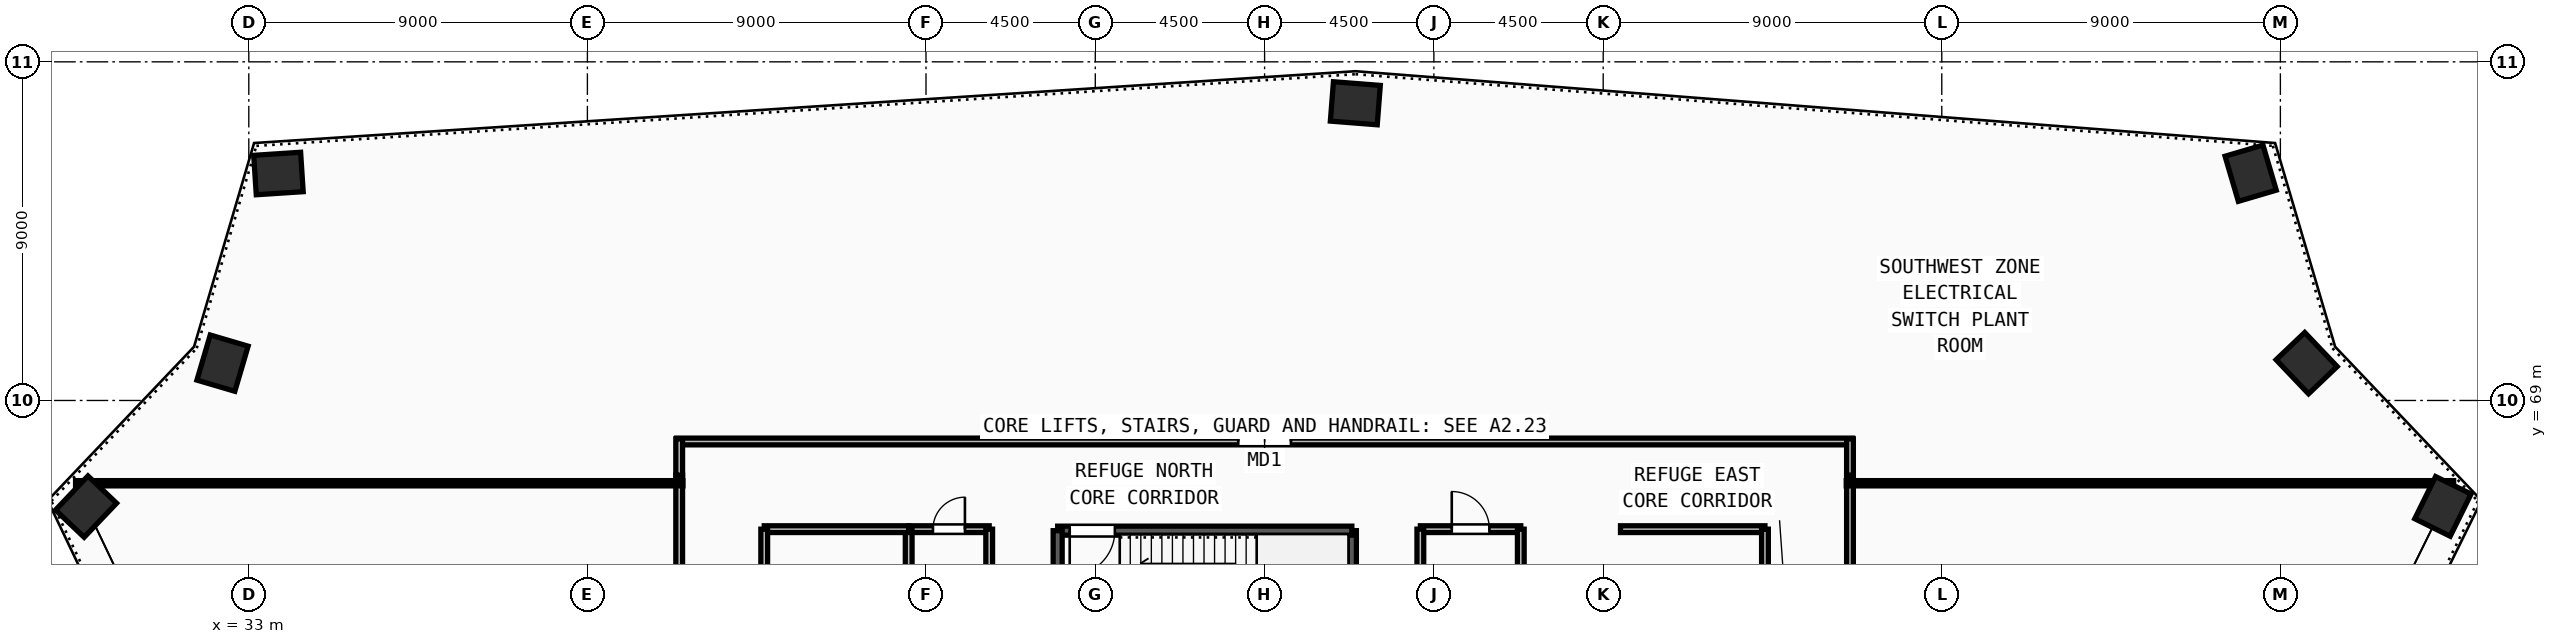
"""IFC4 building model, lengths in metres.
Left out: names, types, materials, properties, quantities, classifications, styles, units other than length and angle.
Written with IfcOpenShell. Run it as: python <this file> out.ifc"""

import sys

from ifc_helpers import new_model, si_unit, direction, frame, frame_2d, origin, origin_2d, place, context, subcontext, project, spatial, rectangle, extrude, source, transform, mapped, element, fill, save


model = new_model("IFC4")
c1 = context("Model", 3, precision=1e-05, world=origin(), true_north=direction((0.0, 1.0)))
c2 = subcontext(c1, "Body", "Model", "MODEL_VIEW")
j1 = project(units=[si_unit("LENGTHUNIT", "METRE"), si_unit("PLANEANGLEUNIT", "RADIAN")], contexts=[c1])
p1 = place(None, origin())
s1 = spatial("IfcSite", under=j1, at=p1, CompositionType="ELEMENT")
p2 = place(p1, origin())
s2 = spatial("IfcBuilding", under=s1, at=p2, CompositionType="ELEMENT")
p3 = place(p2, frame((0.0, 0.0, 277.5)))
s3 = spatial("IfcBuildingStorey", under=s2, at=p3, CompositionType="ELEMENT", Elevation=277.5)
m1 = source(origin(), c2, "Body", "SweptSolid", [
    extrude(rectangle(XDim=1.25, YDim=1.05, at=origin_2d()), origin(), (0.0, 0.0, 1.0), 4.5),
])
for number, where, z_axis, x_axis in (
    (1, (28.674, 66.179, 0.0), (0.0, 0.0, 1.0), (0.689, 0.724, 0.0)),
    (2, (32.302, 69.992, 0.0), (0.0, 0.0, 1.0), (0.283, 0.959, 0.0)),
    (3, (33.788, 75.032, 0.0), (0.0, 0.0, 1.0), (0.998, 0.065, 0.0)),
    (4, (62.412, 76.899, 0.0), (0.0, 0.0, 1.0), (-0.997, 0.078, 0.0)),
    (5, (86.21, 75.04, 0.0), (0.0, 0.0, 1.0), (-0.283, 0.959, 0.0)),
    (6, (87.698, 69.992, 0.0), (0.0, 0.0, 1.0), (-0.689, 0.724, 0.0)),
    (7, (91.32, 66.185, 0.0), (0.0, 0.0, 1.0), (0.443, 0.897, 0.0)),
):
    element("IfcColumn", number, at=place(p3, frame(where, z_axis=z_axis, x_axis=x_axis)), inside=s3, PredefinedType="COLUMN", context=c2, shape_type="MappedRepresentation", body=[
        mapped(m1, transform((0.0, 0.0, 0.0), x_axis=(1.0, 0.0, 0.0), y_axis=(0.0, 1.0, 0.0), z_axis=(0.0, 0.0, 1.0), scale=1.0)),
    ])
p4 = place(p3, frame((62.32, 62.1, 0.0), z_axis=(0.0, 0.0, 1.0), x_axis=(0.0, 1.0, 0.0)))
e8 = element("IfcWall", 8, at=p4, inside=s3, PredefinedType="SOLIDWALL", context=c2, shape_type="SweptSolid", body=[
    extrude(rectangle(XDim=3.44, YDim=0.24, at=frame_2d((1.72, 0.0))), origin(), (0.0, 0.0, 1.0), 4.22),
])
p5 = place(p3, frame((62.32, 65.54, 0.0), z_axis=(0.0, 0.0, 1.0), x_axis=(-1.0, 0.0, 0.0)))
e9 = element("IfcWall", 9, at=p5, inside=s3, PredefinedType="SOLIDWALL", context=c2, shape_type="SweptSolid", body=[
    extrude(rectangle(XDim=7.82, YDim=0.24, at=frame_2d((3.91, 0.0))), origin(), (0.0, 0.0, 1.0), 4.22),
])
m2 = source(origin(), c2, "Body", "SweptSolid", [
    extrude(rectangle(XDim=1.2, YDim=2.2, at=frame_2d((0.6, 1.1))), frame((0.0, 0.13, 0.0), z_axis=(0.0, -1.0, 0.0), x_axis=(1.0, 0.0, 0.0)), (0.0, 0.0, 1.0), 0.26),
])
p6 = place(p5, frame((6.3, 0.0, 0.0)))
e10 = element("IfcOpeningElement", 10, at=p6, cuts=e9, PredefinedType="OPENING", context=c2, shape_type="MappedRepresentation", body=[
    mapped(m2, transform((0.0, 0.0, 0.0), x_axis=(1.0, 0.0, 0.0), y_axis=(0.0, 1.0, 0.0), z_axis=(0.0, 0.0, 1.0), scale=1.0)),
])
p7 = place(p3, frame((54.5, 65.54, 0.0), z_axis=(0.0, 0.0, 1.0), x_axis=(0.0, -1.0, 0.0)))
e11 = element("IfcWall", 11, at=p7, inside=s3, PredefinedType="SOLIDWALL", context=c2, shape_type="SweptSolid", body=[
    extrude(rectangle(XDim=3.44, YDim=0.24, at=frame_2d((1.72, 0.0))), origin(), (0.0, 0.0, 1.0), 4.22),
])
p8 = place(p3, frame((50.54, 65.58, 0.0), z_axis=(0.0, 0.0, 1.0), x_axis=(1.0, 0.0, 0.0)))
e12 = element("IfcWall", 12, at=p8, inside=s3, PredefinedType="PARTITIONING", context=c2, shape_type="SweptSolid", body=[
    extrude(rectangle(XDim=2.14, YDim=0.18, at=frame_2d((1.07, 0.0))), origin(), (0.0, 0.0, 1.0), 4.22),
])
m3 = source(origin(), c2, "Body", "SweptSolid", [
    extrude(rectangle(XDim=0.85, YDim=2.1, at=frame_2d((0.425, 1.05))), frame((0.0, 0.1, 0.0), z_axis=(0.0, -1.0, 0.0), x_axis=(1.0, 0.0, 0.0)), (0.0, 0.0, 1.0), 0.2),
])
p9 = place(p8, frame((0.645, 0.0, 0.0)))
e13 = element("IfcOpeningElement", 13, at=p9, cuts=e12, PredefinedType="OPENING", context=c2, shape_type="MappedRepresentation", body=[
    mapped(m3, transform((0.0, 0.0, 0.0), x_axis=(1.0, 0.0, 0.0), y_axis=(0.0, 1.0, 0.0), z_axis=(0.0, 0.0, 1.0), scale=1.0)),
])
p10 = place(p3, frame((64.14, 65.58, 0.0), z_axis=(0.0, 0.0, 1.0), x_axis=(1.0, 0.0, 0.0)))
e14 = element("IfcWall", 14, at=p10, inside=s3, PredefinedType="PARTITIONING", context=c2, shape_type="SweptSolid", body=[
    extrude(rectangle(XDim=2.67, YDim=0.18, at=frame_2d((1.335, 0.0))), origin(), (0.0, 0.0, 1.0), 4.22),
])
m4 = source(origin(), c2, "Body", "SweptSolid", [
    extrude(rectangle(XDim=1.0, YDim=2.2, at=frame_2d((0.5, 1.1))), frame((0.0, 0.1, 0.0), z_axis=(0.0, -1.0, 0.0), x_axis=(1.0, 0.0, 0.0)), (0.0, 0.0, 1.0), 0.2),
])
p11 = place(p10, frame((0.835, 0.0, 0.0)))
e15 = element("IfcOpeningElement", 15, at=p11, cuts=e14, PredefinedType="OPENING", context=c2, shape_type="MappedRepresentation", body=[
    mapped(m4, transform((0.0, 0.0, 0.0), x_axis=(1.0, 0.0, 0.0), y_axis=(0.0, 1.0, 0.0), z_axis=(0.0, 0.0, 1.0), scale=1.0)),
])
p12 = place(p3, frame((75.56, 67.015, 0.0), z_axis=(0.0, 0.0, 1.0), x_axis=(0.0, -1.0, 0.0)))
e16 = element("IfcWall", 16, at=p12, inside=s3, PredefinedType="PARTITIONING", context=c2, shape_type="SweptSolid", body=[
    extrude(rectangle(XDim=22.43, YDim=0.18, at=frame_2d((11.215, 0.0))), origin(), (0.0, 0.0, 1.0), 4.22),
])
m5 = source(origin(), c2, "Body", "SweptSolid", [
    extrude(rectangle(XDim=1.3, YDim=2.2, at=frame_2d((0.65, 1.1))), frame((0.0, 0.1, 0.0), z_axis=(0.0, -1.0, 0.0), x_axis=(1.0, 0.0, 0.0)), (0.0, 0.0, 1.0), 0.2),
])
p13 = place(p12, frame((10.565, 0.0, 0.0)))
e17 = element("IfcOpeningElement", 17, at=p13, cuts=e16, PredefinedType="OPENING", context=c2, shape_type="MappedRepresentation", body=[
    mapped(m5, transform((0.0, 0.0, 0.0), x_axis=(1.0, 0.0, 0.0), y_axis=(0.0, 1.0, 0.0), z_axis=(0.0, 0.0, 1.0), scale=1.0)),
])
p14 = place(p3, frame((44.37, 67.91, 0.0), z_axis=(0.0, 0.0, 1.0), x_axis=(1.0, 0.0, 0.0)))
e18 = element("IfcWall", 18, at=p14, inside=s3, PredefinedType="PARTITIONING", context=c2, shape_type="SweptSolid", body=[
    extrude(rectangle(XDim=31.26, YDim=0.18, at=frame_2d((15.63, 0.0))), origin(), (0.0, 0.0, 1.0), 3.855),
])
m6 = source(origin(), c2, "Body", "SweptSolid", [
    extrude(rectangle(XDim=1.4, YDim=2.25, at=frame_2d((0.7, 1.125))), frame((0.0, 0.1, 0.0), z_axis=(0.0, -1.0, 0.0), x_axis=(1.0, 0.0, 0.0)), (0.0, 0.0, 1.0), 0.2),
])
p15 = place(p14, frame((14.93, 0.0, 0.0)))
e19 = element("IfcOpeningElement", 19, at=p15, cuts=e18, PredefinedType="OPENING", context=c2, shape_type="MappedRepresentation", body=[
    mapped(m6, transform((0.0, 0.0, 0.0), x_axis=(1.0, 0.0, 0.0), y_axis=(0.0, 1.0, 0.0), z_axis=(0.0, 0.0, 1.0), scale=1.0)),
])
p16 = place(p3, frame((44.44, 55.98, 0.0), z_axis=(0.0, 0.0, 1.0), x_axis=(0.0, 1.0, 0.0)))
e20 = element("IfcWall", 20, at=p16, inside=s3, PredefinedType="PARTITIONING", context=c2, shape_type="SweptSolid", body=[
    extrude(rectangle(XDim=11.035, YDim=0.18, at=frame_2d((5.518, 0.0))), origin(), (0.0, 0.0, 1.0), 4.22),
])
p17 = place(p16, frame((4.518, 0.0, 0.0)))
e21 = element("IfcOpeningElement", 21, at=p17, cuts=e20, PredefinedType="OPENING", context=c2, shape_type="MappedRepresentation", body=[
    mapped(m6, transform((0.0, 0.0, 0.0), x_axis=(1.0, 0.0, 0.0), y_axis=(0.0, 1.0, 0.0), z_axis=(0.0, 0.0, 1.0), scale=1.0)),
])
p18 = place(p3, frame((50.54, 61.95, 0.0), z_axis=(0.0, 0.0, 1.0), x_axis=(0.0, 1.0, 0.0)))
e22 = element("IfcWall", 22, at=p18, inside=s3, PredefinedType="PARTITIONING", context=c2, shape_type="SweptSolid", body=[
    extrude(rectangle(XDim=3.63, YDim=0.18, at=frame_2d((1.815, 0.0))), origin(), (0.0, 0.0, 1.0), 4.22),
])
for number, where, z_axis, x_axis in (
    (23, (52.68, 61.825, 0.0), (0.0, 0.0, 1.0), (0.0, 1.0, 0.0)),
    (24, (64.14, 61.825, 0.0), (0.0, 0.0, 1.0), (0.0, 1.0, 0.0)),
    (25, (66.81, 61.825, 0.0), (0.0, 0.0, 1.0), (0.0, 1.0, 0.0)),
):
    element("IfcWall", number, at=place(p3, frame(where, z_axis=z_axis, x_axis=x_axis)), inside=s3, PredefinedType="PARTITIONING", context=c2, shape_type="SweptSolid", body=[
        extrude(rectangle(XDim=3.755, YDim=0.18, at=frame_2d((1.877, 0.0))), origin(), (0.0, 0.0, 1.0), 4.22),
    ])
for number, where, z_axis, x_axis in (
    (26, (46.7, 65.58, 0.0), (0.0, 0.0, 1.0), (1.0, 0.0, 0.0)),
    (27, (69.46, 65.58, 0.0), (0.0, 0.0, 1.0), (1.0, 0.0, 0.0)),
):
    element("IfcWall", number, at=place(p3, frame(where, z_axis=z_axis, x_axis=x_axis)), inside=s3, PredefinedType="PARTITIONING", context=c2, shape_type="SweptSolid", body=[
        extrude(rectangle(XDim=3.84, YDim=0.18, at=frame_2d((1.92, 0.0))), origin(), (0.0, 0.0, 1.0), 4.22),
    ])
for number, where, z_axis, x_axis in (
    (28, (46.7, 60.06, 0.0), (0.0, 0.0, 1.0), (0.0, 1.0, 0.0)),
    (29, (73.3, 60.06, 0.0), (0.0, 0.0, 1.0), (0.0, 1.0, 0.0)),
):
    element("IfcWall", number, at=place(p3, frame(where, z_axis=z_axis, x_axis=x_axis)), inside=s3, PredefinedType="PARTITIONING", context=c2, shape_type="SweptSolid", body=[
        extrude(rectangle(XDim=5.52, YDim=0.18, at=frame_2d((2.76, 0.0))), origin(), (0.0, 0.0, 1.0), 4.22),
    ])
for number, where, z_axis, x_axis in (
    (30, (44.44, 67.015, 0.0), (0.0, 0.0, 1.0), (0.0, 1.0, 0.0)),
    (31, (75.56, 67.98, 0.0), (0.0, 0.0, 1.0), (0.0, -1.0, 0.0)),
):
    element("IfcWall", number, at=place(p3, frame(where, z_axis=z_axis, x_axis=x_axis)), inside=s3, PredefinedType="PARTITIONING", context=c2, shape_type="SweptSolid", body=[
        extrude(rectangle(XDim=0.965, YDim=0.18, at=frame_2d((0.482, 0.0))), origin(), (0.0, 0.0, 1.0), 4.22),
    ])
for number, where, z_axis, x_axis in (
    (32, (44.54, 66.8, 0.0), (0.0, 0.0, 1.0), (-1.0, 0.0, 0.0)),
    (33, (75.46, 66.8, 0.0), (0.0, 0.0, 1.0), (1.0, 0.0, 0.0)),
):
    element("IfcWall", number, at=place(p3, frame(where, z_axis=z_axis, x_axis=x_axis)), inside=s3, PredefinedType="PARTITIONING", context=c2, shape_type="SweptSolid", body=[
        extrude(rectangle(XDim=16.145, YDim=0.14, at=frame_2d((8.073, 0.0))), origin(), (0.0, 0.0, 1.0), 4.22),
    ])
m7 = source(origin(), c2, "Body", "SweptSolid", [
    extrude(rectangle(XDim=1.2, YDim=2.2, at=frame_2d((0.6, 1.1))), frame((0.0, 0.025, 0.0), z_axis=(0.0, -1.0, 0.0), x_axis=(1.0, 0.0, 0.0)), (0.0, 0.0, 1.0), 0.05),
])
p19 = place(p6, origin())
e34 = element("IfcDoor", 34, at=p19, inside=s3, OperationType="SINGLE_SWING_RIGHT", PredefinedType="DOOR", context=c2, shape_type="MappedRepresentation", body=[
    mapped(m7, transform((0.0, 0.0, 0.0), x_axis=(1.0, 0.0, 0.0), y_axis=(0.0, 1.0, 0.0), z_axis=(0.0, 0.0, 1.0), scale=1.0)),
])
fill(e10, e34)
m8 = source(origin(), c2, "Body", "SweptSolid", [
    extrude(rectangle(XDim=0.85, YDim=2.1, at=frame_2d((0.425, 1.05))), frame((0.0, 0.025, 0.0), z_axis=(0.0, -1.0, 0.0), x_axis=(1.0, 0.0, 0.0)), (0.0, 0.0, 1.0), 0.05),
])
p20 = place(p9, origin())
e35 = element("IfcDoor", 35, at=p20, inside=s3, OperationType="SINGLE_SWING_RIGHT", PredefinedType="DOOR", context=c2, shape_type="MappedRepresentation", body=[
    mapped(m8, transform((0.0, 0.0, 0.0), x_axis=(1.0, 0.0, 0.0), y_axis=(0.0, 1.0, 0.0), z_axis=(0.0, 0.0, 1.0), scale=1.0)),
])
fill(e13, e35)
m9 = source(origin(), c2, "Body", "SweptSolid", [
    extrude(rectangle(XDim=1.0, YDim=2.2, at=frame_2d((0.5, 1.1))), frame((0.0, 0.025, 0.0), z_axis=(0.0, -1.0, 0.0), x_axis=(1.0, 0.0, 0.0)), (0.0, 0.0, 1.0), 0.05),
])
p21 = place(p11, origin())
e36 = element("IfcDoor", 36, at=p21, inside=s3, OperationType="SINGLE_SWING_LEFT", PredefinedType="DOOR", context=c2, shape_type="MappedRepresentation", body=[
    mapped(m9, transform((0.0, 0.0, 0.0), x_axis=(1.0, 0.0, 0.0), y_axis=(0.0, 1.0, 0.0), z_axis=(0.0, 0.0, 1.0), scale=1.0)),
])
fill(e15, e36)
m10 = source(origin(), c2, "Body", "SweptSolid", [
    extrude(rectangle(XDim=1.4, YDim=2.25, at=frame_2d((0.7, 1.125))), frame((0.0, 0.025, 0.0), z_axis=(0.0, -1.0, 0.0), x_axis=(1.0, 0.0, 0.0)), (0.0, 0.0, 1.0), 0.05),
])
p22 = place(p15, origin())
e37 = element("IfcDoor", 37, at=p22, inside=s3, OperationType="DOUBLE_DOOR_SINGLE_SWING", PredefinedType="DOOR", context=c2, shape_type="MappedRepresentation", body=[
    mapped(m10, transform((0.0, 0.0, 0.0), x_axis=(1.0, 0.0, 0.0), y_axis=(0.0, 1.0, 0.0), z_axis=(0.0, 0.0, 1.0), scale=1.0)),
])
fill(e19, e37)
save(model, sys.argv[1])
